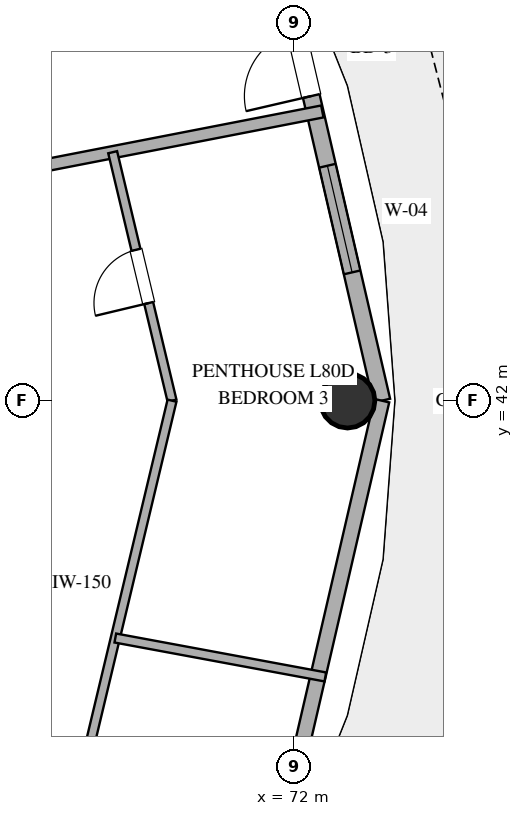
"""IFC4 building model, lengths in metres.
Left out: names, types, materials, properties, quantities, classifications, styles, units other than length and angle.
Written with IfcOpenShell. Run it as: python <this file> out.ifc"""

import sys

from ifc_helpers import new_model, si_unit, direction, frame, frame_2d, origin, origin_2d, place, context, subcontext, project, spatial, rectangle, hollow_circle, extrude, element, fill, save


model = new_model("IFC4")
c1 = context("Model", 3, precision=1e-05, world=origin(), true_north=direction((0.0, 1.0)))
c2 = subcontext(c1, "Body", "Model", "MODEL_VIEW")
j1 = project(units=[si_unit("LENGTHUNIT", "METRE"), si_unit("PLANEANGLEUNIT", "RADIAN")], contexts=[c1])
p1 = place(None, origin())
s1 = spatial("IfcSite", under=j1, at=p1, CompositionType="ELEMENT")
p2 = place(p1, origin())
s2 = spatial("IfcBuilding", under=s1, at=p2, CompositionType="ELEMENT")
p3 = place(p2, frame((0.0, 0.0, 309.0)))
s3 = spatial("IfcBuildingStorey", under=s2, at=p3, CompositionType="ELEMENT", Elevation=309.0)
p4 = place(p3, frame((72.883, 42.0, 0.0), z_axis=(0.0, 0.0, 1.0), x_axis=(1.0, 0.0, 0.0)))
e1 = element("IfcColumn", 1, at=p4, inside=s3, PredefinedType="COLUMN", context=c2, shape_type="SweptSolid", body=[
    extrude(hollow_circle(Radius=0.45, WallThickness=0.025, at=origin_2d()), origin(), (0.0, 0.0, 1.0), 3.37),
])
p5 = place(p3, frame((73.447, 42.0, 0.0), z_axis=(0.0, 0.0, 1.0), x_axis=(-0.225635078214, 0.974211892495, 0.0)))
e2 = element("IfcWall", 2, at=p5, inside=s3, PredefinedType="SOLIDWALL", context=c2, shape_type="SweptSolid", body=[
    extrude(rectangle(XDim=7.77, YDim=0.28, at=frame_2d((3.885, 0.0))), origin(), (0.0, 0.0, 1.0), 3.37),
])
p6 = place(p5, frame((2.166, 0.0, 0.85)))
e3 = element("IfcOpeningElement", 3, at=p6, cuts=e2, PredefinedType="OPENING", context=c2, shape_type="SweptSolid", body=[
    extrude(rectangle(XDim=1.8, YDim=2.2, at=frame_2d((0.9, 1.1))), frame((0.0, 0.15, 0.0), z_axis=(0.0, -1.0, 0.0), x_axis=(1.0, 0.0, 0.0)), (0.0, 0.0, 1.0), 0.3),
])
p7 = place(p5, frame((5.142, 0.0, 0.0)))
e4 = element("IfcOpeningElement", 4, at=p7, cuts=e2, PredefinedType="OPENING", context=c2, shape_type="SweptSolid", body=[
    extrude(rectangle(XDim=1.1, YDim=2.25, at=frame_2d((0.55, 1.125))), frame((0.0, 0.15, 0.0), z_axis=(0.0, -1.0, 0.0), x_axis=(1.0, 0.0, 0.0)), (0.0, 0.0, 1.0), 0.3),
])
p8 = place(p3, frame((71.694, 34.43, 0.0), z_axis=(0.0, 0.0, 1.0), x_axis=(0.225635078214, 0.974211892495, 0.0)))
e5 = element("IfcWall", 5, at=p8, inside=s3, PredefinedType="SOLIDWALL", context=c2, shape_type="SweptSolid", body=[
    extrude(rectangle(XDim=7.77, YDim=0.25, at=frame_2d((3.885, 0.0))), origin(), (0.0, 0.0, 1.0), 3.37),
])
p9 = place(p3, frame((61.2, 44.566, 0.0), z_axis=(0.0, 0.0, 1.0), x_axis=(0.981626456647, 0.190812734402, 0.0)))
e6 = element("IfcWall", 6, at=p9, inside=s3, PredefinedType="PARTITIONING", context=c2, shape_type="SweptSolid", body=[
    extrude(rectangle(XDim=11.479, YDim=0.2, at=frame_2d((5.74, 0.0))), origin(), (0.0, 0.0, 1.0), 2.73),
])
p10 = place(p3, frame((69.996, 42.0, 0.0), z_axis=(0.0, 0.0, 1.0), x_axis=(-0.23229355625, 0.972645723645, 0.0)))
e7 = element("IfcWall", 7, at=p10, inside=s3, PredefinedType="PARTITIONING", context=c2, shape_type="SweptSolid", body=[
    extrude(rectangle(XDim=4.201, YDim=0.15, at=frame_2d((2.101, 0.0))), origin(), (0.0, 0.0, 1.0), 2.73),
])
p11 = place(p10, frame((1.65, 0.0, 0.0)))
e8 = element("IfcOpeningElement", 8, at=p11, cuts=e7, PredefinedType="OPENING", context=c2, shape_type="SweptSolid", body=[
    extrude(rectangle(XDim=0.9, YDim=2.1, at=frame_2d((0.45, 1.05))), frame((0.0, 0.085, 0.0), z_axis=(0.0, -1.0, 0.0), x_axis=(1.0, 0.0, 0.0)), (0.0, 0.0, 1.0), 0.17),
])
p12 = place(p3, frame((68.481, 35.655, 0.0), z_axis=(0.0, 0.0, 1.0), x_axis=(0.232298462197, 0.972644551962, 0.0)))
e9 = element("IfcWall", 9, at=p12, inside=s3, PredefinedType="PARTITIONING", context=c2, shape_type="SweptSolid", body=[
    extrude(rectangle(XDim=6.523, YDim=0.15, at=frame_2d((3.262, 0.0))), origin(), (0.0, 0.0, 1.0), 2.73),
])
p13 = place(p3, frame((72.518, 37.457, 0.0), z_axis=(0.0, 0.0, 1.0), x_axis=(-0.983264946239, 0.182181353322, 0.0)))
e10 = element("IfcWall", 10, at=p13, inside=s3, PredefinedType="PARTITIONING", context=c2, shape_type="SweptSolid", body=[
    extrude(rectangle(XDim=3.512, YDim=0.15, at=frame_2d((1.756, 0.0))), origin(), (0.0, 0.0, 1.0), 2.73),
])
p14 = place(p6, origin())
e11 = element("IfcWindow", 11, at=p14, inside=s3, PartitioningType="SINGLE_PANEL", PredefinedType="WINDOW", context=c2, shape_type="SweptSolid", body=[
    extrude(rectangle(XDim=1.8, YDim=2.2, at=frame_2d((0.9, 1.1))), frame((0.0, 0.03, 0.0), z_axis=(0.0, -1.0, 0.0), x_axis=(1.0, 0.0, 0.0)), (0.0, 0.0, 1.0), 0.06),
])
fill(e3, e11)
p15 = place(p7, origin())
e12 = element("IfcDoor", 12, at=p15, inside=s3, OperationType="SINGLE_SWING_LEFT", PredefinedType="DOOR", context=c2, shape_type="SweptSolid", body=[
    extrude(rectangle(XDim=1.1, YDim=2.25, at=frame_2d((0.55, 1.125))), frame((0.0, 0.025, 0.0), z_axis=(0.0, -1.0, 0.0), x_axis=(1.0, 0.0, 0.0)), (0.0, 0.0, 1.0), 0.05),
])
fill(e4, e12)
p16 = place(p11, origin())
e13 = element("IfcDoor", 13, at=p16, inside=s3, OperationType="SINGLE_SWING_LEFT", PredefinedType="DOOR", context=c2, shape_type="SweptSolid", body=[
    extrude(rectangle(XDim=0.9, YDim=2.1, at=frame_2d((0.45, 1.05))), frame((0.0, 0.025, 0.0), z_axis=(0.0, -1.0, 0.0), x_axis=(1.0, 0.0, 0.0)), (0.0, 0.0, 1.0), 0.05),
])
fill(e8, e13)
save(model, sys.argv[1])
